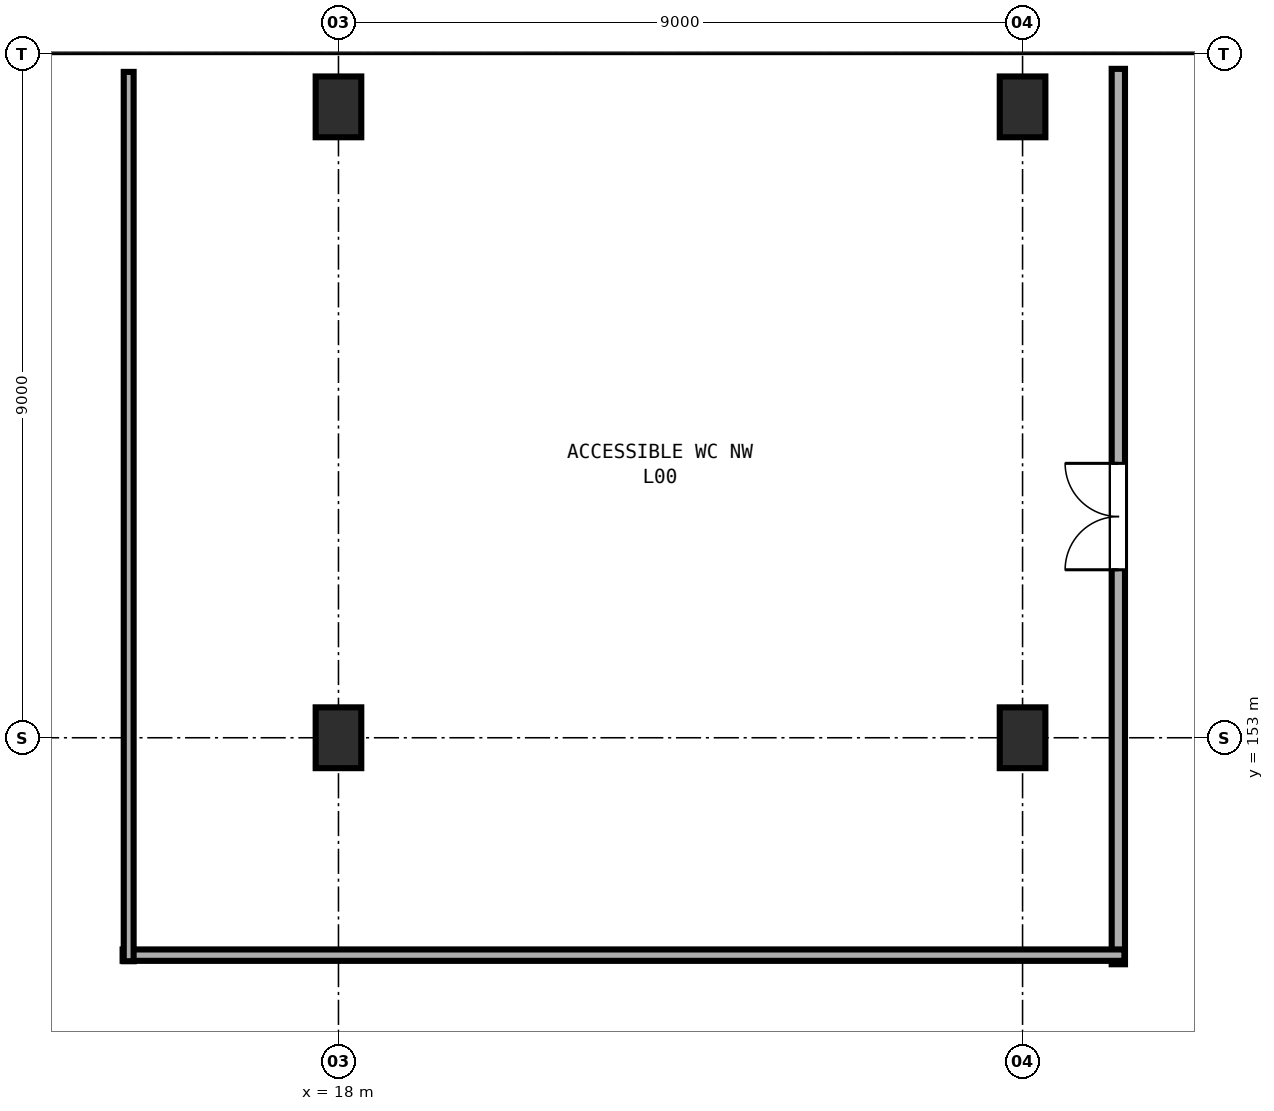
"""IFC4 building model, lengths in metres.
Left out: names, types, materials, properties, quantities, classifications, styles, units other than length and angle.
Written with IfcOpenShell. Run it as: python <this file> out.ifc"""

import sys

from ifc_helpers import new_model, si_unit, direction, frame, frame_2d, origin, origin_2d, place, context, subcontext, project, spatial, rectangle, extrude, element, fill, save


model = new_model("IFC4")
c1 = context("Model", 3, precision=1e-05, world=origin(), true_north=direction((0.0, 1.0)))
c2 = subcontext(c1, "Body", "Model", "MODEL_VIEW")
j1 = project(units=[si_unit("LENGTHUNIT", "METRE"), si_unit("PLANEANGLEUNIT", "RADIAN")], contexts=[c1])
p1 = place(None, origin())
s1 = spatial("IfcSite", under=j1, at=p1, CompositionType="ELEMENT")
p2 = place(p1, origin())
s2 = spatial("IfcBuilding", under=s1, at=p2, CompositionType="ELEMENT")
p3 = place(p2, origin())
s3 = spatial("IfcBuildingStorey", under=s2, at=p3, CompositionType="ELEMENT", Elevation=0.0)
for number, where, z_axis, x_axis in (
    (1, (18.0, 153.0, 0.0), (0.0, 0.0, 1.0), (1.0, 0.0, 0.0)),
    (2, (18.0, 161.3, 0.0), (0.0, 0.0, 1.0), (1.0, 0.0, 0.0)),
    (3, (27.0, 153.0, 0.0), (0.0, 0.0, 1.0), (1.0, 0.0, 0.0)),
    (4, (27.0, 161.3, 0.0), (0.0, 0.0, 1.0), (1.0, 0.0, 0.0)),
):
    element("IfcColumn", number, at=place(p3, frame(where, z_axis=z_axis, x_axis=x_axis)), inside=s3, PredefinedType="COLUMN", context=c2, shape_type="SweptSolid", body=[
        extrude(rectangle(XDim=0.6, YDim=0.8, at=origin_2d()), origin(), (0.0, 0.0, 1.0), 4.8),
    ])
p4 = place(p3, frame((9.305, 161.8, 0.0), z_axis=(0.0, 0.0, 1.0), x_axis=(1.0, 0.0, 0.0)))
e5 = element("IfcWall", 5, at=p4, inside=s3, PredefinedType="SOLIDWALL", context=c2, shape_type="SweptSolid", body=[
    extrude(rectangle(XDim=8.39, YDim=0.29, at=frame_2d((4.195, 0.0))), origin(), (0.0, 0.0, 1.0), 3.58),
])
p5 = place(p4, frame((2.97, 0.0, 0.0)))
e6 = element("IfcOpeningElement", 6, at=p5, cuts=e5, PredefinedType="OPENING", context=c2, shape_type="SweptSolid", body=[
    extrude(rectangle(XDim=2.45, YDim=2.2, at=frame_2d((1.225, 1.1))), frame((0.0, 0.155, 0.0), z_axis=(0.0, -1.0, 0.0), x_axis=(1.0, 0.0, 0.0)), (0.0, 0.0, 1.0), 0.31),
])
p6 = place(p3, frame((18.305, 161.8, 0.0), z_axis=(0.0, 0.0, 1.0), x_axis=(1.0, 0.0, 0.0)))
e7 = element("IfcWall", 7, at=p6, inside=s3, PredefinedType="SOLIDWALL", context=c2, shape_type="SweptSolid", body=[
    extrude(rectangle(XDim=8.39, YDim=0.5, at=frame_2d((4.195, 0.0))), origin(), (0.0, 0.0, 1.0), 3.58),
])
p7 = place(p6, frame((3.07, 0.0, 0.0)))
e8 = element("IfcOpeningElement", 8, at=p7, cuts=e7, PredefinedType="OPENING", context=c2, shape_type="SweptSolid", body=[
    extrude(rectangle(XDim=2.25, YDim=2.15, at=frame_2d((1.125, 1.075))), frame((0.0, 0.26, 0.0), z_axis=(0.0, -1.0, 0.0), x_axis=(1.0, 0.0, 0.0)), (0.0, 0.0, 1.0), 0.52),
])
p8 = place(p3, frame((27.305, 161.8, 0.0), z_axis=(0.0, 0.0, 1.0), x_axis=(1.0, 0.0, 0.0)))
e9 = element("IfcWall", 9, at=p8, inside=s3, PredefinedType="SOLIDWALL", context=c2, shape_type="SweptSolid", body=[
    extrude(rectangle(XDim=8.39, YDim=0.48, at=frame_2d((4.195, 0.0))), origin(), (0.0, 0.0, 1.0), 3.58),
])
p9 = place(p8, frame((1.395, 0.0, 0.0)))
e10 = element("IfcOpeningElement", 10, at=p9, cuts=e9, PredefinedType="OPENING", context=c2, shape_type="SweptSolid", body=[
    extrude(rectangle(XDim=3.6, YDim=2.6, at=frame_2d((1.8, 1.3))), frame((0.0, 0.25, 0.0), z_axis=(0.0, -1.0, 0.0), x_axis=(1.0, 0.0, 0.0)), (0.0, 0.0, 1.0), 0.5),
])
p10 = place(p3, frame((28.26, 150.02, 0.0), z_axis=(0.0, 0.0, 1.0), x_axis=(0.0, 1.0, 0.0)))
e11 = element("IfcWall", 11, at=p10, inside=s3, PredefinedType="PARTITIONING", context=c2, shape_type="SweptSolid", body=[
    extrude(rectangle(XDim=11.78, YDim=0.175, at=frame_2d((5.89, 0.0))), origin(), (0.0, 0.0, 1.0), 3.28),
])
p11 = place(p10, frame((5.19, 0.0, 0.0)))
e12 = element("IfcOpeningElement", 12, at=p11, cuts=e11, PredefinedType="OPENING", context=c2, shape_type="SweptSolid", body=[
    extrude(rectangle(XDim=1.4, YDim=2.15, at=frame_2d((0.7, 1.075))), frame((0.0, 0.097, 0.0), z_axis=(0.0, -1.0, 0.0), x_axis=(1.0, 0.0, 0.0)), (0.0, 0.0, 1.0), 0.195),
])
p12 = place(p3, frame((28.34, 150.14, 0.0), z_axis=(0.0, 0.0, 1.0), x_axis=(-1.0, 0.0, 0.0)))
e13 = element("IfcWall", 13, at=p12, inside=s3, PredefinedType="PARTITIONING", context=c2, shape_type="SweptSolid", body=[
    extrude(rectangle(XDim=13.18, YDim=0.15, at=frame_2d((6.59, 0.0))), origin(), (0.0, 0.0, 1.0), 3.28),
])
p13 = place(p3, frame((15.24, 150.06, 0.0), z_axis=(0.0, 0.0, 1.0), x_axis=(0.0, 1.0, 0.0)))
e14 = element("IfcWall", 14, at=p13, inside=s3, PredefinedType="PARTITIONING", context=c2, shape_type="SweptSolid", body=[
    extrude(rectangle(XDim=11.7, YDim=0.13, at=frame_2d((5.85, 0.0))), origin(), (0.0, 0.0, 1.0), 3.28),
])
p14 = place(p9, origin())
e15 = element("IfcDoor", 15, at=p14, inside=s3, OperationType="DOUBLE_DOOR_SINGLE_SWING", PredefinedType="DOOR", context=c2, shape_type="SweptSolid", body=[
    extrude(rectangle(XDim=3.6, YDim=2.6, at=frame_2d((1.8, 1.3))), frame((0.0, 0.025, 0.0), z_axis=(0.0, -1.0, 0.0), x_axis=(1.0, 0.0, 0.0)), (0.0, 0.0, 1.0), 0.05),
])
fill(e10, e15)
p15 = place(p5, origin())
e16 = element("IfcDoor", 16, at=p15, inside=s3, OperationType="DOUBLE_DOOR_SINGLE_SWING", PredefinedType="GATE", context=c2, shape_type="SweptSolid", body=[
    extrude(rectangle(XDim=2.45, YDim=2.2, at=frame_2d((1.225, 1.1))), frame((0.0, 0.025, 0.0), z_axis=(0.0, -1.0, 0.0), x_axis=(1.0, 0.0, 0.0)), (0.0, 0.0, 1.0), 0.05),
])
fill(e6, e16)
p16 = place(p7, origin())
e17 = element("IfcDoor", 17, at=p16, inside=s3, OperationType="DOUBLE_DOOR_SINGLE_SWING", PredefinedType="GATE", context=c2, shape_type="SweptSolid", body=[
    extrude(rectangle(XDim=2.25, YDim=2.15, at=frame_2d((1.125, 1.075))), frame((0.0, 0.025, 0.0), z_axis=(0.0, -1.0, 0.0), x_axis=(1.0, 0.0, 0.0)), (0.0, 0.0, 1.0), 0.05),
])
fill(e8, e17)
p17 = place(p11, origin())
e18 = element("IfcDoor", 18, at=p17, inside=s3, OperationType="DOUBLE_DOOR_SINGLE_SWING", PredefinedType="DOOR", context=c2, shape_type="SweptSolid", body=[
    extrude(rectangle(XDim=1.4, YDim=2.15, at=frame_2d((0.7, 1.075))), frame((0.0, 0.025, 0.0), z_axis=(0.0, -1.0, 0.0), x_axis=(1.0, 0.0, 0.0)), (0.0, 0.0, 1.0), 0.05),
])
fill(e12, e18)
save(model, sys.argv[1])
